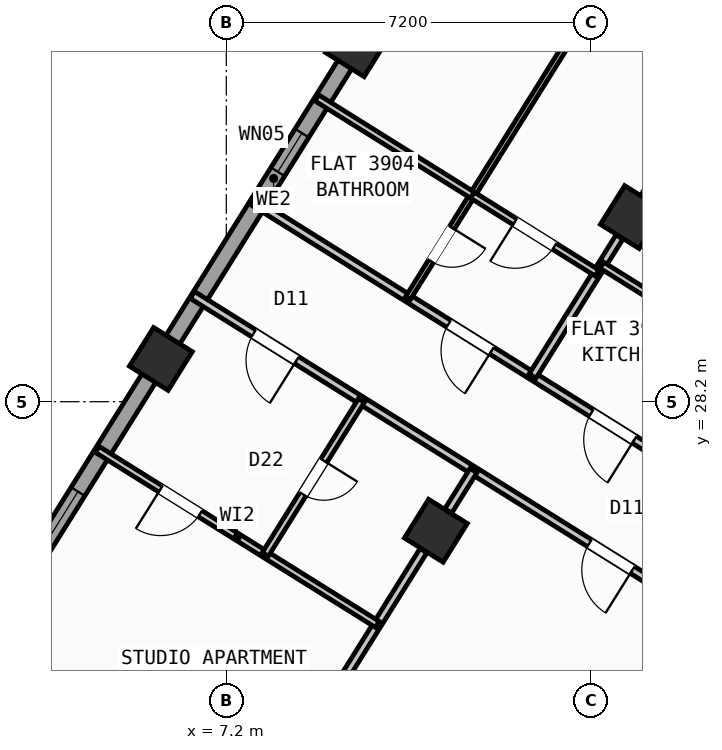
"""IFC4 building model, lengths in metres.
Left out: names, types, materials, properties, quantities, classifications, styles, units other than length and angle.
Written with IfcOpenShell. Run it as: python <this file> out.ifc"""

import sys

from ifc_helpers import new_model, si_unit, direction, frame, frame_2d, origin, origin_2d, place, context, subcontext, project, spatial, rectangle, hollow_rectangle, extrude, source, transform, mapped, element, fill, save


model = new_model("IFC4")
c1 = context("Model", 3, precision=1e-05, world=origin(), true_north=direction((0.0, 1.0)))
c2 = subcontext(c1, "Body", "Model", "MODEL_VIEW")
j1 = project(units=[si_unit("LENGTHUNIT", "METRE"), si_unit("PLANEANGLEUNIT", "RADIAN")], contexts=[c1])
p1 = place(None, origin())
s1 = spatial("IfcSite", under=j1, at=p1, CompositionType="ELEMENT")
p2 = place(p1, origin())
s2 = spatial("IfcBuilding", under=s1, at=p2, CompositionType="ELEMENT")
p3 = place(p2, frame((0.0, 0.0, 155.1)))
s3 = spatial("IfcBuildingStorey", under=s2, at=p3, CompositionType="ELEMENT", Elevation=155.1)
m1 = source(origin(), c2, "Body", "SweptSolid", [
    extrude(hollow_rectangle(XDim=0.9, YDim=0.9, WallThickness=0.036, at=origin_2d()), origin(), (0.0, 0.0, 1.0), 3.6),
])
for number, where, z_axis, x_axis in (
    (1, (15.205, 31.844, 0.0), (0.0, 0.0, 1.0), (-0.848, 0.53, 0.0)),
    (2, (11.336, 25.653, 0.0), (0.0, 0.0, 1.0), (-0.848, 0.53, 0.0)),
    (3, (9.777, 35.235, 0.0), (0.0, 0.0, 1.0), (-0.848, 0.53, 0.0)),
    (4, (5.909, 29.044, 0.0), (0.0, 0.0, 1.0), (-0.848, 0.53, 0.0)),
):
    element("IfcColumn", number, at=place(p3, frame(where, z_axis=z_axis, x_axis=x_axis)), inside=s3, PredefinedType="COLUMN", context=c2, shape_type="MappedRepresentation", body=[
        mapped(m1, transform((0.0, 0.0, 0.0), scale=1.0)),
    ])
p4 = place(p3, frame((29.268, 6.429, 0.0), z_axis=(0.0, 0.0, 1.0), x_axis=(-0.848049971435, 0.529916263149, 0.0)))
e5 = element("IfcWall", 5, at=p4, inside=s3, PredefinedType="STANDARD", context=c2, shape_type="SweptSolid", body=[
    extrude(rectangle(XDim=31.588, YDim=0.32, at=frame_2d((15.794, 0.0))), origin(), (0.0, 0.0, 1.0), 3.35),
])
p5 = place(p4, frame((16.362, 0.0, 0.0)))
e6 = element("IfcOpeningElement", 6, at=p5, cuts=e5, PredefinedType="OPENING", context=c2, shape_type="SweptSolid", body=[
    extrude(rectangle(XDim=1.2, YDim=2.15, at=frame_2d((0.6, 1.075))), frame((0.0, 0.17, 0.0), z_axis=(0.0, -1.0, 0.0), x_axis=(1.0, 0.0, 0.0)), (0.0, 0.0, 1.0), 0.34),
])
p6 = place(p4, frame((2.989, 0.0, 0.8)))
e7 = element("IfcOpeningElement", 7, at=p6, cuts=e5, PredefinedType="OPENING", context=c2, shape_type="SweptSolid", body=[
    extrude(rectangle(XDim=2.1, YDim=1.55, at=frame_2d((1.05, 0.775))), frame((0.0, 0.17, 0.0), z_axis=(0.0, -1.0, 0.0), x_axis=(1.0, 0.0, 0.0)), (0.0, 0.0, 1.0), 0.34),
])
p7 = place(p4, frame((8.359, 0.0, 0.8)))
e8 = element("IfcOpeningElement", 8, at=p7, cuts=e5, PredefinedType="OPENING", context=c2, shape_type="SweptSolid", body=[
    extrude(rectangle(XDim=2.1, YDim=1.55, at=frame_2d((1.05, 0.775))), frame((0.0, 0.17, 0.0), z_axis=(0.0, -1.0, 0.0), x_axis=(1.0, 0.0, 0.0)), (0.0, 0.0, 1.0), 0.34),
])
p8 = place(p4, frame((13.284, 0.0, 0.95)))
e9 = element("IfcOpeningElement", 9, at=p8, cuts=e5, PredefinedType="OPENING", context=c2, shape_type="SweptSolid", body=[
    extrude(rectangle(XDim=1.2, YDim=1.4, at=frame_2d((0.6, 0.7))), frame((0.0, 0.17, 0.0), z_axis=(0.0, -1.0, 0.0), x_axis=(1.0, 0.0, 0.0)), (0.0, 0.0, 1.0), 0.34),
])
p9 = place(p4, frame((20.259, 0.0, 0.95)))
e10 = element("IfcOpeningElement", 10, at=p9, cuts=e5, PredefinedType="OPENING", context=c2, shape_type="SweptSolid", body=[
    extrude(rectangle(XDim=1.2, YDim=1.4, at=frame_2d((0.6, 0.7))), frame((0.0, 0.17, 0.0), z_axis=(0.0, -1.0, 0.0), x_axis=(1.0, 0.0, 0.0)), (0.0, 0.0, 1.0), 0.34),
])
p10 = place(p4, frame((22.929, 0.0, 0.95)))
e11 = element("IfcOpeningElement", 11, at=p10, cuts=e5, PredefinedType="OPENING", context=c2, shape_type="SweptSolid", body=[
    extrude(rectangle(XDim=1.2, YDim=1.4, at=frame_2d((0.6, 0.7))), frame((0.0, 0.17, 0.0), z_axis=(0.0, -1.0, 0.0), x_axis=(1.0, 0.0, 0.0)), (0.0, 0.0, 1.0), 0.34),
])
p11 = place(p4, frame((27.481, 0.0, 0.8)))
e12 = element("IfcOpeningElement", 12, at=p11, cuts=e5, PredefinedType="OPENING", context=c2, shape_type="SweptSolid", body=[
    extrude(rectangle(XDim=2.1, YDim=1.55, at=frame_2d((1.05, 0.775))), frame((0.0, 0.17, 0.0), z_axis=(0.0, -1.0, 0.0), x_axis=(1.0, 0.0, 0.0)), (0.0, 0.0, 1.0), 0.34),
])
p12 = place(p3, frame((2.415, 23.452, 0.0), z_axis=(0.0, 0.0, 1.0), x_axis=(0.52991049553, 0.848053575387, 0.0)))
e13 = element("IfcWall", 13, at=p12, inside=s3, PredefinedType="STANDARD", context=c2, shape_type="SweptSolid", body=[
    extrude(rectangle(XDim=21.587, YDim=0.32, at=frame_2d((10.794, 0.0))), origin(), (0.0, 0.0, 1.0), 2.775),
])
p13 = place(p12, frame((1.406, 0.0, 0.8)))
e14 = element("IfcOpeningElement", 14, at=p13, cuts=e13, PredefinedType="OPENING", context=c2, shape_type="SweptSolid", body=[
    extrude(rectangle(XDim=2.1, YDim=1.55, at=frame_2d((1.05, 0.775))), frame((0.0, 0.17, 0.0), z_axis=(0.0, -1.0, 0.0), x_axis=(1.0, 0.0, 0.0)), (0.0, 0.0, 1.0), 0.34),
])
p14 = place(p12, frame((10.949, 0.0, 1.0)))
e15 = element("IfcOpeningElement", 15, at=p14, cuts=e13, PredefinedType="OPENING", context=c2, shape_type="SweptSolid", body=[
    extrude(rectangle(XDim=0.9, YDim=1.25, at=frame_2d((0.45, 0.625))), frame((0.0, 0.17, 0.0), z_axis=(0.0, -1.0, 0.0), x_axis=(1.0, 0.0, 0.0)), (0.0, 0.0, 1.0), 0.34),
])
p15 = place(p12, frame((15.369, 0.0, 0.85)))
e16 = element("IfcOpeningElement", 16, at=p15, cuts=e13, PredefinedType="OPENING", context=c2, shape_type="SweptSolid", body=[
    extrude(rectangle(XDim=1.5, YDim=1.5, at=frame_2d((0.75, 0.75))), frame((0.0, 0.17, 0.0), z_axis=(0.0, -1.0, 0.0), x_axis=(1.0, 0.0, 0.0)), (0.0, 0.0, 1.0), 0.34),
])
p16 = place(p12, frame((18.219, 0.0, 0.85)))
e17 = element("IfcOpeningElement", 17, at=p16, cuts=e13, PredefinedType="OPENING", context=c2, shape_type="SweptSolid", body=[
    extrude(rectangle(XDim=1.5, YDim=1.5, at=frame_2d((0.75, 0.75))), frame((0.0, 0.17, 0.0), z_axis=(0.0, -1.0, 0.0), x_axis=(1.0, 0.0, 0.0)), (0.0, 0.0, 1.0), 0.34),
])
p17 = place(p3, frame((14.138, 41.825, 0.0), z_axis=(0.0, 0.0, 1.0), x_axis=(0.848046498049, -0.529921821731, 0.0)))
e18 = element("IfcWall", 18, at=p17, inside=s3, PredefinedType="STANDARD", context=c2, shape_type="SweptSolid", body=[
    extrude(rectangle(XDim=31.588, YDim=0.32, at=frame_2d((15.794, 0.0))), origin(), (0.0, 0.0, 1.0), 3.35),
])
p18 = place(p17, frame((9.792, 0.0, 0.0)))
e19 = element("IfcOpeningElement", 19, at=p18, cuts=e18, PredefinedType="OPENING", context=c2, shape_type="SweptSolid", body=[
    extrude(rectangle(XDim=1.05, YDim=2.15, at=frame_2d((0.525, 1.075))), frame((0.0, 0.17, 0.0), z_axis=(0.0, -1.0, 0.0), x_axis=(1.0, 0.0, 0.0)), (0.0, 0.0, 1.0), 0.34),
])
p19 = place(p17, frame((0.791, 0.0, 0.85)))
e20 = element("IfcOpeningElement", 20, at=p19, cuts=e18, PredefinedType="OPENING", context=c2, shape_type="SweptSolid", body=[
    extrude(rectangle(XDim=1.8, YDim=1.5, at=frame_2d((0.9, 0.75))), frame((0.0, 0.17, 0.0), z_axis=(0.0, -1.0, 0.0), x_axis=(1.0, 0.0, 0.0)), (0.0, 0.0, 1.0), 0.34),
])
p20 = place(p17, frame((3.996, 0.0, 0.95)))
e21 = element("IfcOpeningElement", 21, at=p20, cuts=e18, PredefinedType="OPENING", context=c2, shape_type="SweptSolid", body=[
    extrude(rectangle(XDim=1.2, YDim=1.4, at=frame_2d((0.6, 0.7))), frame((0.0, 0.17, 0.0), z_axis=(0.0, -1.0, 0.0), x_axis=(1.0, 0.0, 0.0)), (0.0, 0.0, 1.0), 0.34),
])
p21 = place(p17, frame((13.874, 0.0, 0.85)))
e22 = element("IfcOpeningElement", 22, at=p21, cuts=e18, PredefinedType="OPENING", context=c2, shape_type="SweptSolid", body=[
    extrude(rectangle(XDim=1.5, YDim=1.5, at=frame_2d((0.75, 0.75))), frame((0.0, 0.17, 0.0), z_axis=(0.0, -1.0, 0.0), x_axis=(1.0, 0.0, 0.0)), (0.0, 0.0, 1.0), 0.34),
])
p22 = place(p17, frame((17.104, 0.0, 1.0)))
e23 = element("IfcOpeningElement", 23, at=p22, cuts=e18, PredefinedType="OPENING", context=c2, shape_type="SweptSolid", body=[
    extrude(rectangle(XDim=0.9, YDim=1.25, at=frame_2d((0.45, 0.625))), frame((0.0, 0.17, 0.0), z_axis=(0.0, -1.0, 0.0), x_axis=(1.0, 0.0, 0.0)), (0.0, 0.0, 1.0), 0.34),
])
p23 = place(p17, frame((22.069, 0.0, 1.0)))
e24 = element("IfcOpeningElement", 24, at=p23, cuts=e18, PredefinedType="OPENING", context=c2, shape_type="SweptSolid", body=[
    extrude(rectangle(XDim=0.9, YDim=1.25, at=frame_2d((0.45, 0.625))), frame((0.0, 0.17, 0.0), z_axis=(0.0, -1.0, 0.0), x_axis=(1.0, 0.0, 0.0)), (0.0, 0.0, 1.0), 0.34),
])
p24 = place(p17, frame((27.519, 0.0, 1.0)))
e25 = element("IfcOpeningElement", 25, at=p24, cuts=e18, PredefinedType="OPENING", context=c2, shape_type="SweptSolid", body=[
    extrude(rectangle(XDim=0.9, YDim=1.25, at=frame_2d((0.45, 0.625))), frame((0.0, 0.17, 0.0), z_axis=(0.0, -1.0, 0.0), x_axis=(1.0, 0.0, 0.0)), (0.0, 0.0, 1.0), 0.34),
])
p25 = place(p3, frame((21.885, 23.306, 0.0), z_axis=(0.0, 0.0, 1.0), x_axis=(-0.848052408131, 0.529912363569, 0.0)))
e26 = element("IfcWall", 26, at=p25, inside=s3, PredefinedType="PARTITIONING", context=c2, shape_type="SweptSolid", body=[
    extrude(rectangle(XDim=16.73, YDim=0.16, at=frame_2d((8.365, 0.0))), origin(), (0.0, 0.0, 1.0), 3.34),
])
p26 = place(p25, frame((1.395, 0.0, 0.0)))
e27 = element("IfcOpeningElement", 27, at=p26, cuts=e26, PredefinedType="OPENING", context=c2, shape_type="SweptSolid", body=[
    extrude(rectangle(XDim=1.0, YDim=2.1, at=frame_2d((0.5, 1.05))), frame((0.0, 0.09, 0.0), z_axis=(0.0, -1.0, 0.0), x_axis=(1.0, 0.0, 0.0)), (0.0, 0.0, 1.0), 0.18),
])
p27 = place(p25, frame((7.82, 0.0, 0.0)))
e28 = element("IfcOpeningElement", 28, at=p27, cuts=e26, PredefinedType="OPENING", context=c2, shape_type="SweptSolid", body=[
    extrude(rectangle(XDim=1.0, YDim=2.1, at=frame_2d((0.5, 1.05))), frame((0.0, 0.09, 0.0), z_axis=(0.0, -1.0, 0.0), x_axis=(1.0, 0.0, 0.0)), (0.0, 0.0, 1.0), 0.18),
])
p28 = place(p25, frame((11.14, 0.0, 0.0)))
e29 = element("IfcOpeningElement", 29, at=p28, cuts=e26, PredefinedType="OPENING", context=c2, shape_type="SweptSolid", body=[
    extrude(rectangle(XDim=1.0, YDim=2.1, at=frame_2d((0.5, 1.05))), frame((0.0, 0.09, 0.0), z_axis=(0.0, -1.0, 0.0), x_axis=(1.0, 0.0, 0.0)), (0.0, 0.0, 1.0), 0.18),
])
p29 = place(p3, frame((20.719, 21.44, 0.0), z_axis=(0.0, 0.0, 1.0), x_axis=(-0.848048310262, 0.529918921593, 0.0)))
e30 = element("IfcWall", 30, at=p29, inside=s3, PredefinedType="PARTITIONING", context=c2, shape_type="SweptSolid", body=[
    extrude(rectangle(XDim=16.73, YDim=0.16, at=frame_2d((8.365, 0.0))), origin(), (0.0, 0.0, 1.0), 3.34),
])
p30 = place(p29, frame((2.22, 0.0, 0.0)))
e31 = element("IfcOpeningElement", 31, at=p30, cuts=e30, PredefinedType="OPENING", context=c2, shape_type="SweptSolid", body=[
    extrude(rectangle(XDim=0.86, YDim=2.05, at=frame_2d((0.43, 1.025))), frame((0.0, 0.09, 0.0), z_axis=(0.0, -1.0, 0.0), x_axis=(1.0, 0.0, 0.0)), (0.0, 0.0, 1.0), 0.18),
])
p31 = place(p29, frame((6.49, 0.0, 0.0)))
e32 = element("IfcOpeningElement", 32, at=p31, cuts=e30, PredefinedType="OPENING", context=c2, shape_type="SweptSolid", body=[
    extrude(rectangle(XDim=1.0, YDim=2.1, at=frame_2d((0.5, 1.05))), frame((0.0, 0.09, 0.0), z_axis=(0.0, -1.0, 0.0), x_axis=(1.0, 0.0, 0.0)), (0.0, 0.0, 1.0), 0.18),
])
p32 = place(p29, frame((14.304, 0.0, 0.0)))
e33 = element("IfcOpeningElement", 33, at=p32, cuts=e30, PredefinedType="OPENING", context=c2, shape_type="SweptSolid", body=[
    extrude(rectangle(XDim=1.0, YDim=2.1, at=frame_2d((0.5, 1.05))), frame((0.0, 0.09, 0.0), z_axis=(0.0, -1.0, 0.0), x_axis=(1.0, 0.0, 0.0)), (0.0, 0.0, 1.0), 0.18),
])
p33 = place(p3, frame((12.078, 26.84, 0.0), z_axis=(0.0, 0.0, 1.0), x_axis=(-0.529952145338, -0.848027548876, 0.0)))
e34 = element("IfcWall", 34, at=p33, inside=s3, PredefinedType="PARTITIONING", context=c2, shape_type="SweptSolid", body=[
    extrude(rectangle(XDim=0.938, YDim=0.16, at=frame_2d((0.469, 0.0))), origin(), (0.0, 0.0, 1.0), 2.775),
])
p34 = place(p3, frame((11.091, 25.261, 0.0), z_axis=(0.0, 0.0, 1.0), x_axis=(-0.52994257524, -0.848033529377, 0.0)))
e35 = element("IfcWall", 35, at=p34, inside=s3, PredefinedType="PARTITIONING", context=c2, shape_type="SweptSolid", body=[
    extrude(rectangle(XDim=5.451, YDim=0.16, at=frame_2d((2.726, 0.0))), origin(), (0.0, 0.0, 1.0), 2.775),
])
p35 = place(p3, frame((10.181, 23.804, 0.0), z_axis=(0.0, 0.0, 1.0), x_axis=(-0.848065614912, 0.529891227332, 0.0)))
e36 = element("IfcWall", 36, at=p35, inside=s3, PredefinedType="PLUMBINGWALL", context=c2, shape_type="SweptSolid", body=[
    extrude(rectangle(XDim=6.52, YDim=0.14, at=frame_2d((3.26, 0.0))), origin(), (0.0, 0.0, 1.0), 3.34),
])
p36 = place(p35, frame((4.124, 0.0, 0.0)))
e37 = element("IfcOpeningElement", 37, at=p36, cuts=e36, PredefinedType="OPENING", context=c2, shape_type="SweptSolid", body=[
    extrude(rectangle(XDim=0.92, YDim=2.08, at=frame_2d((0.46, 1.04))), frame((0.0, 0.08, 0.0), z_axis=(0.0, -1.0, 0.0), x_axis=(1.0, 0.0, 0.0)), (0.0, 0.0, 1.0), 0.16),
])
p37 = place(p3, frame((9.866, 28.222, 0.0), z_axis=(0.0, 0.0, 1.0), x_axis=(-0.529876336437, -0.84807491891, 0.0)))
e38 = element("IfcWall", 38, at=p37, inside=s3, PredefinedType="PLUMBINGWALL", context=c2, shape_type="SweptSolid", body=[
    extrude(rectangle(XDim=3.58, YDim=0.14, at=frame_2d((1.79, 0.0))), origin(), (0.0, 0.0, 1.0), 3.34),
])
p38 = place(p37, frame((1.4, 0.0, 0.0)))
e39 = element("IfcOpeningElement", 39, at=p38, cuts=e38, PredefinedType="OPENING", context=c2, shape_type="SweptSolid", body=[
    extrude(rectangle(XDim=0.78, YDim=2.05, at=frame_2d((0.39, 1.025))), frame((0.0, 0.08, 0.0), z_axis=(0.0, -1.0, 0.0), x_axis=(1.0, 0.0, 0.0)), (0.0, 0.0, 1.0), 0.16),
])
p39 = place(p3, frame((18.828, 37.643, 0.0), z_axis=(0.0, 0.0, 1.0), x_axis=(-0.529930102756, -0.848041323399, 0.0)))
e40 = element("IfcWall", 40, at=p39, inside=s3, PredefinedType="PARTITIONING", context=c2, shape_type="SweptSolid", body=[
    extrude(rectangle(XDim=6.376, YDim=0.16, at=frame_2d((3.188, 0.0))), origin(), (0.0, 0.0, 1.0), 2.775),
])
p40 = place(p3, frame((14.96, 31.452, 0.0), z_axis=(0.0, 0.0, 1.0), x_axis=(-0.529924383291, -0.848044897393, 0.0)))
e41 = element("IfcWall", 41, at=p40, inside=s3, PredefinedType="PARTITIONING", context=c2, shape_type="SweptSolid", body=[
    extrude(rectangle(XDim=3.238, YDim=0.16, at=frame_2d((1.619, 0.0))), origin(), (0.0, 0.0, 1.0), 2.775),
])
p41 = place(p3, frame((20.039, 27.502, 0.0), z_axis=(0.0, 0.0, 1.0), x_axis=(-0.848039019877, 0.529933789039, 0.0)))
e42 = element("IfcWall", 42, at=p41, inside=s3, PredefinedType="PLUMBINGWALL", context=c2, shape_type="SweptSolid", body=[
    extrude(rectangle(XDim=6.4, YDim=0.14, at=frame_2d((3.2, 0.0))), origin(), (0.0, 0.0, 1.0), 3.34),
])
p42 = place(p41, frame((2.824, 0.0, 0.0)))
e43 = element("IfcOpeningElement", 43, at=p42, cuts=e42, PredefinedType="OPENING", context=c2, shape_type="SweptSolid", body=[
    extrude(rectangle(XDim=0.78, YDim=2.05, at=frame_2d((0.39, 1.025))), frame((0.0, 0.08, 0.0), z_axis=(0.0, -1.0, 0.0), x_axis=(1.0, 0.0, 0.0)), (0.0, 0.0, 1.0), 0.16),
])
p43 = place(p3, frame((16.995, 40.182, 0.0), z_axis=(0.0, 0.0, 1.0), x_axis=(-0.529927783988, -0.848042772363, 0.0)))
e44 = element("IfcWall", 44, at=p43, inside=s3, PredefinedType="PARTITIONING", context=c2, shape_type="SweptSolid", body=[
    extrude(rectangle(XDim=11.72, YDim=0.11, at=frame_2d((5.86, 0.0))), origin(), (0.0, 0.0, 1.0), 3.34),
])
p44 = place(p43, frame((10.08, 0.0, 0.0)))
e45 = element("IfcOpeningElement", 45, at=p44, cuts=e44, PredefinedType="OPENING", context=c2, shape_type="SweptSolid", body=[
    extrude(rectangle(XDim=0.78, YDim=2.05, at=frame_2d((0.39, 1.025))), frame((0.0, 0.065, 0.0), z_axis=(0.0, -1.0, 0.0), x_axis=(1.0, 0.0, 0.0)), (0.0, 0.0, 1.0), 0.13),
])
p45 = place(p43, frame((4.2, 0.0, 0.0)))
e46 = element("IfcOpeningElement", 46, at=p45, cuts=e44, PredefinedType="OPENING", context=c2, shape_type="SweptSolid", body=[
    extrude(rectangle(XDim=0.92, YDim=2.08, at=frame_2d((0.46, 1.04))), frame((0.0, 0.065, 0.0), z_axis=(0.0, -1.0, 0.0), x_axis=(1.0, 0.0, 0.0)), (0.0, 0.0, 1.0), 0.13),
])
p46 = place(p3, frame((14.516, 30.741, 0.0), z_axis=(0.0, 0.0, 1.0), x_axis=(-0.848059786386, 0.529900555496, 0.0)))
e47 = element("IfcWall", 47, at=p46, inside=s3, PredefinedType="PLUMBINGWALL", context=c2, shape_type="SweptSolid", body=[
    extrude(rectangle(XDim=2.9, YDim=0.14, at=frame_2d((1.45, 0.0))), origin(), (0.0, 0.0, 1.0), 3.34),
])
p47 = place(p46, frame((0.99, 0.0, 0.0)))
e48 = element("IfcOpeningElement", 48, at=p47, cuts=e47, PredefinedType="OPENING", context=c2, shape_type="SweptSolid", body=[
    extrude(rectangle(XDim=0.92, YDim=2.08, at=frame_2d((0.46, 1.04))), frame((0.0, 0.08, 0.0), z_axis=(0.0, -1.0, 0.0), x_axis=(1.0, 0.0, 0.0)), (0.0, 0.0, 1.0), 0.16),
])
p48 = place(p3, frame((12.056, 32.278, 0.0), z_axis=(0.0, 0.0, 1.0), x_axis=(-0.848039976902, 0.529932257535, 0.0)))
e49 = element("IfcWall", 49, at=p48, inside=s3, PredefinedType="PLUMBINGWALL", context=c2, shape_type="SweptSolid", body=[
    extrude(rectangle(XDim=3.62, YDim=0.14, at=frame_2d((1.81, 0.0))), origin(), (0.0, 0.0, 1.0), 3.34),
])
m2 = source(origin(), c2, "Body", "SweptSolid", [
    extrude(rectangle(XDim=2.1, YDim=1.55, at=frame_2d((1.05, 0.775))), frame((0.0, 0.03, 0.0), z_axis=(0.0, -1.0, 0.0), x_axis=(1.0, 0.0, 0.0)), (0.0, 0.0, 1.0), 0.06),
])
p49 = place(p13, origin())
e50 = element("IfcWindow", 50, at=p49, inside=s3, PartitioningType="SINGLE_PANEL", PredefinedType="WINDOW", context=c2, shape_type="MappedRepresentation", body=[
    mapped(m2, transform((0.0, 0.0, 0.0), scale=1.0)),
])
fill(e14, e50)
m3 = source(origin(), c2, "Body", "SweptSolid", [
    extrude(rectangle(XDim=0.9, YDim=1.25, at=frame_2d((0.45, 0.625))), frame((0.0, 0.03, 0.0), z_axis=(0.0, -1.0, 0.0), x_axis=(1.0, 0.0, 0.0)), (0.0, 0.0, 1.0), 0.06),
])
p50 = place(p14, origin())
e51 = element("IfcWindow", 51, at=p50, inside=s3, PartitioningType="SINGLE_PANEL", PredefinedType="WINDOW", context=c2, shape_type="MappedRepresentation", body=[
    mapped(m3, transform((0.0, 0.0, 0.0), scale=1.0)),
])
fill(e15, e51)
m4 = source(origin(), c2, "Body", "SweptSolid", [
    extrude(rectangle(XDim=1.0, YDim=2.1, at=frame_2d((0.5, 1.05))), frame((0.0, 0.025, 0.0), z_axis=(0.0, -1.0, 0.0), x_axis=(1.0, 0.0, 0.0)), (0.0, 0.0, 1.0), 0.05),
])
p51 = place(p31, origin())
e52 = element("IfcDoor", 52, at=p51, inside=s3, OperationType="SINGLE_SWING_LEFT", PredefinedType="DOOR", context=c2, shape_type="MappedRepresentation", body=[
    mapped(m4, transform((0.0, 0.0, 0.0), scale=1.0)),
])
fill(e32, e52)
p52 = place(p32, origin())
e53 = element("IfcDoor", 53, at=p52, inside=s3, OperationType="SINGLE_SWING_LEFT", PredefinedType="DOOR", context=c2, shape_type="MappedRepresentation", body=[
    mapped(m4, transform((0.0, 0.0, 0.0), scale=1.0)),
])
fill(e33, e53)
m5 = source(origin(), c2, "Body", "SweptSolid", [
    extrude(rectangle(XDim=0.92, YDim=2.08, at=frame_2d((0.46, 1.04))), frame((0.0, 0.025, 0.0), z_axis=(0.0, -1.0, 0.0), x_axis=(1.0, 0.0, 0.0)), (0.0, 0.0, 1.0), 0.05),
])
p53 = place(p36, origin())
e54 = element("IfcDoor", 54, at=p53, inside=s3, OperationType="SINGLE_SWING_RIGHT", PredefinedType="DOOR", context=c2, shape_type="MappedRepresentation", body=[
    mapped(m5, transform((0.0, 0.0, 0.0), scale=1.0)),
])
fill(e37, e54)
m6 = source(origin(), c2, "Body", "SweptSolid", [
    extrude(rectangle(XDim=0.78, YDim=2.05, at=frame_2d((0.39, 1.025))), frame((0.0, 0.025, 0.0), z_axis=(0.0, -1.0, 0.0), x_axis=(1.0, 0.0, 0.0)), (0.0, 0.0, 1.0), 0.05),
])
p54 = place(p38, origin())
e55 = element("IfcDoor", 55, at=p54, inside=s3, OperationType="SINGLE_SWING_LEFT", PredefinedType="DOOR", context=c2, shape_type="MappedRepresentation", body=[
    mapped(m6, transform((0.0, 0.0, 0.0), scale=1.0)),
])
fill(e39, e55)
p55 = place(p27, origin())
e56 = element("IfcDoor", 56, at=p55, inside=s3, OperationType="SINGLE_SWING_LEFT", PredefinedType="DOOR", context=c2, shape_type="MappedRepresentation", body=[
    mapped(m4, transform((0.0, 0.0, 0.0), scale=1.0)),
])
fill(e28, e56)
p56 = place(p28, origin())
e57 = element("IfcDoor", 57, at=p56, inside=s3, OperationType="SINGLE_SWING_LEFT", PredefinedType="DOOR", context=c2, shape_type="MappedRepresentation", body=[
    mapped(m4, transform((0.0, 0.0, 0.0), scale=1.0)),
])
fill(e29, e57)
p57 = place(p47, origin())
e58 = element("IfcDoor", 58, at=p57, inside=s3, OperationType="SINGLE_SWING_RIGHT", PredefinedType="DOOR", context=c2, shape_type="MappedRepresentation", body=[
    mapped(m5, transform((0.0, 0.0, 0.0), scale=1.0)),
])
fill(e48, e58)
p58 = place(p44, origin())
e59 = element("IfcDoor", 59, at=p58, inside=s3, OperationType="SINGLE_SWING_LEFT", PredefinedType="DOOR", context=c2, shape_type="MappedRepresentation", body=[
    mapped(m6, transform((0.0, 0.0, 0.0), scale=1.0)),
])
fill(e45, e59)
save(model, sys.argv[1])
